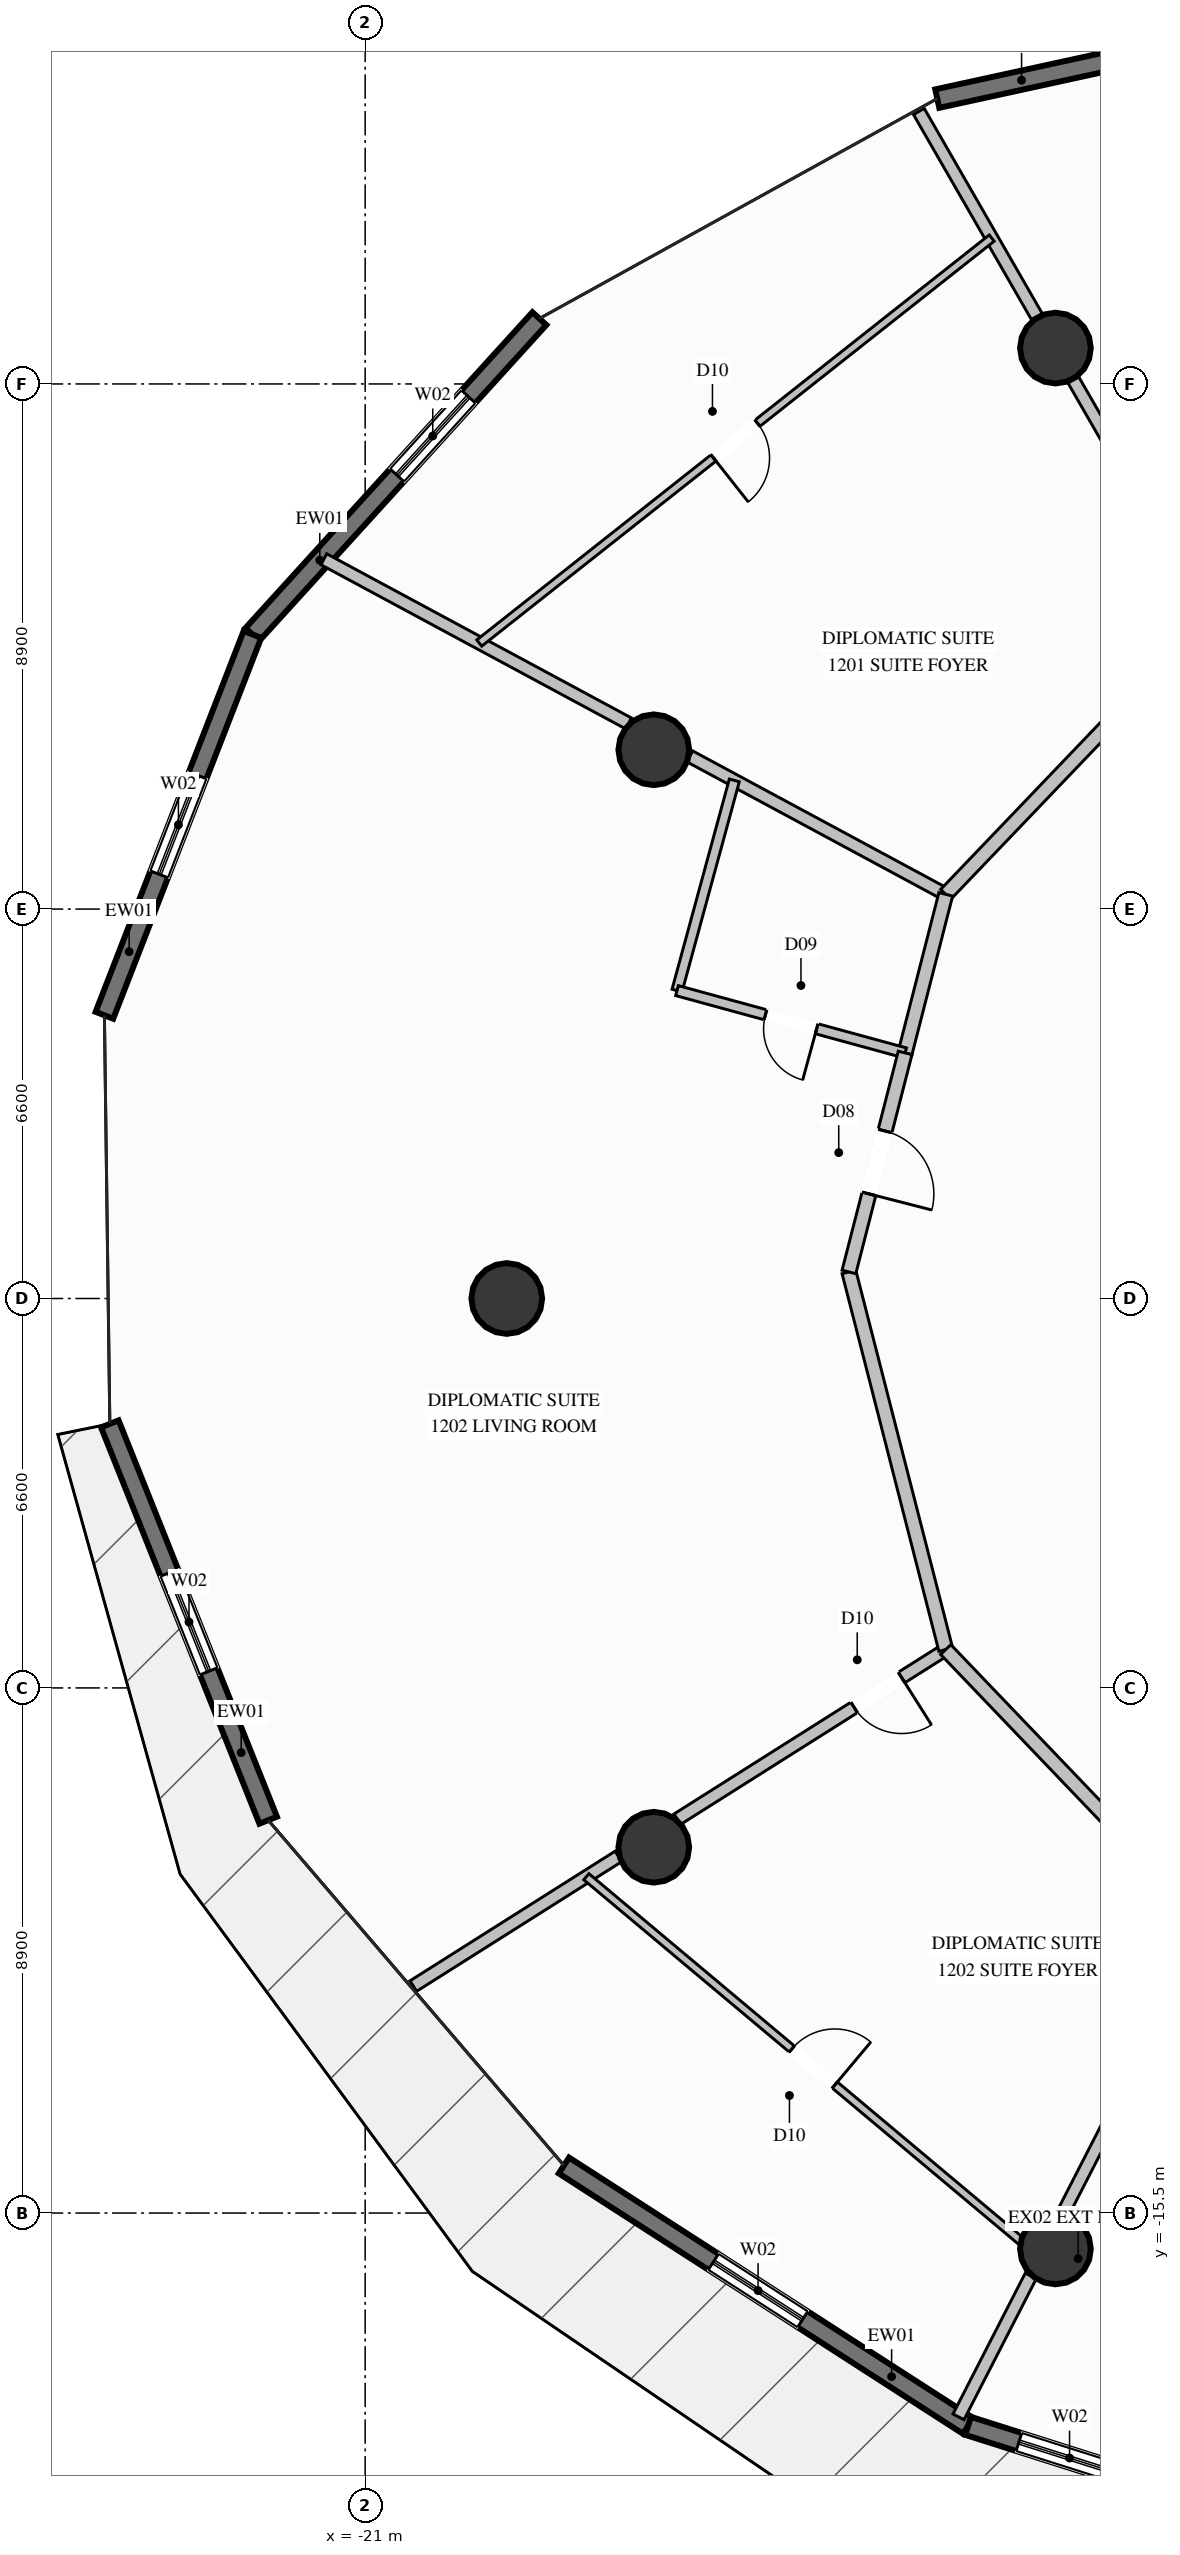
"""IFC4 building model, lengths in metres.
Left out: names, types, materials, properties, quantities, classifications, styles, units other than length and angle.
Written with IfcOpenShell. Run it as: python <this file> out.ifc"""

import sys

from ifc_helpers import new_model, si_unit, direction, frame, frame_2d, origin, origin_2d, place, context, subcontext, project, spatial, rectangle, circle, extrude, element, fill, save


model = new_model("IFC4")
c1 = context("Model", 3, precision=1e-05, world=origin(), true_north=direction((0.0, 1.0)))
c2 = subcontext(c1, "Body", "Model", "MODEL_VIEW")
j1 = project(units=[si_unit("LENGTHUNIT", "METRE"), si_unit("PLANEANGLEUNIT", "RADIAN")], contexts=[c1])
p1 = place(None, origin())
s1 = spatial("IfcSite", under=j1, at=p1, CompositionType="ELEMENT")
p2 = place(p1, origin())
s2 = spatial("IfcBuilding", under=s1, at=p2, CompositionType="ELEMENT")
p3 = place(p2, frame((0.0, 0.0, 46.4)))
s3 = spatial("IfcBuildingStorey", under=s2, at=p3, CompositionType="ELEMENT", Elevation=46.4)
for number, where, z_axis, x_axis in (
    (1, (-9.3, 16.108, 0.0), (0.0, 0.0, 1.0), (1.0, 0.0, 0.0)),
    (2, (-16.108, 9.3, 0.0), (0.0, 0.0, 1.0), (1.0, 0.0, 0.0)),
    (3, (-18.6, 0.0, 0.0), (0.0, 0.0, 1.0), (1.0, 0.0, 0.0)),
    (4, (-16.108, -9.3, 0.0), (0.0, 0.0, 1.0), (1.0, 0.0, 0.0)),
    (5, (-9.3, -16.108, 0.0), (0.0, 0.0, 1.0), (1.0, 0.0, 0.0)),
):
    element("IfcColumn", number, at=place(p3, frame(where, z_axis=z_axis, x_axis=x_axis)), inside=s3, PredefinedType="COLUMN", context=c2, shape_type="SweptSolid", body=[
        extrude(circle(Radius=0.6, at=origin_2d()), origin(), (0.0, 0.0, 1.0), 3.6),
    ])
p4 = place(p3, frame((-11.303, 20.336, 0.0), z_axis=(0.0, 0.0, 1.0), x_axis=(0.977017916809, 0.213157196066, 0.0)))
e6 = element("IfcWall", 6, at=p4, inside=s3, PredefinedType="SOLIDWALL", context=c2, shape_type="SweptSolid", body=[
    extrude(rectangle(XDim=8.149, YDim=0.32, at=frame_2d((4.075, 0.0))), origin(), (0.0, 0.0, 1.0), 3.34),
])
p5 = place(p4, frame((3.175, 0.0, 0.35)))
e7 = element("IfcOpeningElement", 7, at=p5, cuts=e6, PredefinedType="OPENING", context=c2, shape_type="SweptSolid", body=[
    extrude(rectangle(XDim=1.8, YDim=2.6, at=frame_2d((0.9, 1.3))), frame((0.0, 0.17, 0.0), z_axis=(0.0, -1.0, 0.0), x_axis=(1.0, 0.0, 0.0)), (0.0, 0.0, 1.0), 0.34),
])
p6 = place(p3, frame((-22.911, 11.255, 0.0), z_axis=(0.0, 0.0, 1.0), x_axis=(0.67247451432, 0.740120279137, 0.0)))
e8 = element("IfcWall", 8, at=p6, inside=s3, PredefinedType="SOLIDWALL", context=c2, shape_type="SweptSolid", body=[
    extrude(rectangle(XDim=7.233, YDim=0.32, at=frame_2d((3.616, 0.0))), origin(), (0.0, 0.0, 1.0), 3.34),
])
p7 = place(p6, frame((3.645, 0.0, 0.35)))
e9 = element("IfcOpeningElement", 9, at=p7, cuts=e8, PredefinedType="OPENING", context=c2, shape_type="SweptSolid", body=[
    extrude(rectangle(XDim=1.8, YDim=2.6, at=frame_2d((0.9, 1.3))), frame((0.0, 0.17, 0.0), z_axis=(0.0, -1.0, 0.0), x_axis=(1.0, 0.0, 0.0)), (0.0, 0.0, 1.0), 0.34),
])
p8 = place(p3, frame((-25.42, 4.8, 0.0), z_axis=(0.0, 0.0, 1.0), x_axis=(0.362298249398, 0.93206221814, 0.0)))
e10 = element("IfcWall", 10, at=p8, inside=s3, PredefinedType="SOLIDWALL", context=c2, shape_type="SweptSolid", body=[
    extrude(rectangle(XDim=6.925, YDim=0.32, at=frame_2d((3.463, 0.0))), origin(), (0.0, 0.0, 1.0), 3.34),
])
p9 = place(p8, frame((2.563, 0.0, 0.35)))
e11 = element("IfcOpeningElement", 11, at=p9, cuts=e10, PredefinedType="OPENING", context=c2, shape_type="SweptSolid", body=[
    extrude(rectangle(XDim=1.8, YDim=2.6, at=frame_2d((0.9, 1.3))), frame((0.0, 0.17, 0.0), z_axis=(0.0, -1.0, 0.0), x_axis=(1.0, 0.0, 0.0)), (0.0, 0.0, 1.0), 0.34),
])
p10 = place(p3, frame((-22.644, -8.842, 0.0), z_axis=(0.0, 0.0, 1.0), x_axis=(-0.371035671342, 0.928618614175, 0.0)))
e12 = element("IfcWall", 12, at=p10, inside=s3, PredefinedType="SOLIDWALL", context=c2, shape_type="SweptSolid", body=[
    extrude(rectangle(XDim=7.233, YDim=0.32, at=frame_2d((3.617, 0.0))), origin(), (0.0, 0.0, 1.0), 3.34),
])
p11 = place(p10, frame((2.717, 0.0, 0.35)))
e13 = element("IfcOpeningElement", 13, at=p11, cuts=e12, PredefinedType="OPENING", context=c2, shape_type="SweptSolid", body=[
    extrude(rectangle(XDim=1.8, YDim=2.6, at=frame_2d((0.9, 1.3))), frame((0.0, 0.17, 0.0), z_axis=(0.0, -1.0, 0.0), x_axis=(1.0, 0.0, 0.0)), (0.0, 0.0, 1.0), 0.34),
])
p12 = place(p3, frame((-10.78, -19.107, 0.0), z_axis=(0.0, 0.0, 1.0), x_axis=(-0.840699239941, 0.541502343451, 0.0)))
e14 = element("IfcWall", 14, at=p12, inside=s3, PredefinedType="SOLIDWALL", context=c2, shape_type="SweptSolid", body=[
    extrude(rectangle(XDim=8.149, YDim=0.32, at=frame_2d((4.075, 0.0))), origin(), (0.0, 0.0, 1.0), 3.34),
])
p13 = place(p12, frame((3.335, 0.0, 0.35)))
e15 = element("IfcOpeningElement", 15, at=p13, cuts=e14, PredefinedType="OPENING", context=c2, shape_type="SweptSolid", body=[
    extrude(rectangle(XDim=1.8, YDim=2.6, at=frame_2d((0.9, 1.3))), frame((0.0, 0.17, 0.0), z_axis=(0.0, -1.0, 0.0), x_axis=(1.0, 0.0, 0.0)), (0.0, 0.0, 1.0), 0.34),
])
p14 = place(p3, frame((-2.761, -21.65, 0.0), z_axis=(0.0, 0.0, 1.0), x_axis=(-0.953218809013, 0.302281164059, 0.0)))
e16 = element("IfcWall", 16, at=p14, inside=s3, PredefinedType="SOLIDWALL", context=c2, shape_type="SweptSolid", body=[
    extrude(rectangle(XDim=8.413, YDim=0.32, at=frame_2d((4.206, 0.0))), origin(), (0.0, 0.0, 1.0), 3.34),
])
p15 = place(p14, frame((5.709, 0.0, 0.35)))
e17 = element("IfcOpeningElement", 17, at=p15, cuts=e16, PredefinedType="OPENING", context=c2, shape_type="SweptSolid", body=[
    extrude(rectangle(XDim=1.8, YDim=2.6, at=frame_2d((0.9, 1.3))), frame((0.0, 0.17, 0.0), z_axis=(0.0, -1.0, 0.0), x_axis=(1.0, 0.0, 0.0)), (0.0, 0.0, 1.0), 0.34),
])
p16 = place(p14, frame((3.656, 0.0, 0.0)))
e18 = element("IfcOpeningElement", 18, at=p16, cuts=e16, PredefinedType="OPENING", context=c2, shape_type="SweptSolid", body=[
    extrude(rectangle(XDim=1.1, YDim=2.2, at=frame_2d((0.55, 1.1))), frame((0.0, 0.17, 0.0), z_axis=(0.0, -1.0, 0.0), x_axis=(1.0, 0.0, 0.0)), (0.0, 0.0, 1.0), 0.34),
])
p17 = place(p3, frame((-6.675, 11.535, 0.0), z_axis=(0.0, 0.0, 1.0), x_axis=(-0.498786523098, 0.866724872365, 0.0)))
e19 = element("IfcWall", 19, at=p17, inside=s3, PredefinedType="PARTITIONING", context=c2, shape_type="SweptSolid", body=[
    extrude(rectangle(XDim=4.653, YDim=0.21, at=frame_2d((2.327, 0.0))), origin(), (0.0, 0.0, 1.0), 2.709),
])
p18 = place(p17, frame((0.741, 0.0, 0.0)))
e20 = element("IfcOpeningElement", 20, at=p18, cuts=e19, PredefinedType="OPENING", context=c2, shape_type="SweptSolid", body=[
    extrude(rectangle(XDim=0.95, YDim=2.1, at=frame_2d((0.475, 1.05))), frame((0.0, 0.115, 0.0), z_axis=(0.0, -1.0, 0.0), x_axis=(1.0, 0.0, 0.0)), (0.0, 0.0, 1.0), 0.23),
])
p19 = place(p3, frame((-9.615, 16.642, 0.0), z_axis=(0.0, 0.0, 1.0), x_axis=(-0.498733039203, 0.866755649308, 0.0)))
e21 = element("IfcWall", 21, at=p19, inside=s3, PredefinedType="PARTITIONING", context=c2, shape_type="SweptSolid", body=[
    extrude(rectangle(XDim=4.01, YDim=0.21, at=frame_2d((2.005, 0.0))), origin(), (0.0, 0.0, 1.0), 3.34),
])
p20 = place(p3, frame((-11.159, 6.85, 0.0), z_axis=(0.0, 0.0, 1.0), x_axis=(-0.880348601535, 0.474327249665, 0.0)))
e22 = element("IfcWall", 22, at=p20, inside=s3, PredefinedType="PARTITIONING", context=c2, shape_type="SweptSolid", body=[
    extrude(rectangle(XDim=4.929, YDim=0.21, at=frame_2d((2.464, 0.0))), origin(), (0.0, 0.0, 1.0), 2.709),
])
p21 = place(p3, frame((-16.537, 9.747, 0.0), z_axis=(0.0, 0.0, 1.0), x_axis=(-0.880366830353, 0.47429341553, 0.0)))
e23 = element("IfcWall", 23, at=p21, inside=s3, PredefinedType="PARTITIONING", context=c2, shape_type="SweptSolid", body=[
    extrude(rectangle(XDim=5.865, YDim=0.21, at=frame_2d((2.933, 0.0))), origin(), (0.0, 0.0, 1.0), 3.34),
])
p22 = place(p3, frame((-11.159, -5.95, 0.0), z_axis=(0.0, 0.0, 1.0), x_axis=(-0.845381098804, -0.534163643264, 0.0)))
e24 = element("IfcWall", 24, at=p22, inside=s3, PredefinedType="PARTITIONING", context=c2, shape_type="SweptSolid", body=[
    extrude(rectangle(XDim=5.382, YDim=0.21, at=frame_2d((2.691, 0.0))), origin(), (0.0, 0.0, 1.0), 2.709),
])
p23 = place(p22, frame((0.886, 0.0, 0.0)))
e25 = element("IfcOpeningElement", 25, at=p23, cuts=e24, PredefinedType="OPENING", context=c2, shape_type="SweptSolid", body=[
    extrude(rectangle(XDim=0.95, YDim=2.1, at=frame_2d((0.475, 1.05))), frame((0.0, 0.115, 0.0), z_axis=(0.0, -1.0, 0.0), x_axis=(1.0, 0.0, 0.0)), (0.0, 0.0, 1.0), 0.23),
])
p24 = place(p3, frame((-16.708, -9.456, 0.0), z_axis=(0.0, 0.0, 1.0), x_axis=(-0.845312509881, -0.534272178425, 0.0)))
e26 = element("IfcWall", 26, at=p24, inside=s3, PredefinedType="PARTITIONING", context=c2, shape_type="SweptSolid", body=[
    extrude(rectangle(XDim=4.112, YDim=0.21, at=frame_2d((2.056, 0.0))), origin(), (0.0, 0.0, 1.0), 3.34),
])
p25 = place(p3, frame((-6.675, -10.635, 0.0), z_axis=(0.0, 0.0, 1.0), x_axis=(-0.456563129712, -0.889691018605, 0.0)))
e27 = element("IfcWall", 27, at=p25, inside=s3, PredefinedType="PARTITIONING", context=c2, shape_type="SweptSolid", body=[
    extrude(rectangle(XDim=5.469, YDim=0.21, at=frame_2d((2.735, 0.0))), origin(), (0.0, 0.0, 1.0), 2.709),
])
p26 = place(p3, frame((-9.718, -16.566, 0.0), z_axis=(0.0, 0.0, 1.0), x_axis=(-0.456431135396, -0.889758741818, 0.0)))
e28 = element("IfcWall", 28, at=p26, inside=s3, PredefinedType="PARTITIONING", context=c2, shape_type="SweptSolid", body=[
    extrude(rectangle(XDim=2.684, YDim=0.21, at=frame_2d((1.342, 0.0))), origin(), (0.0, 0.0, 1.0), 3.34),
])
p27 = place(p3, frame((-6.675, 11.535, 0.0), z_axis=(0.0, 0.0, 1.0), x_axis=(-0.691444859665, -0.722429239471, 0.0)))
e29 = element("IfcWall", 29, at=p27, inside=s3, PredefinedType="PARTITIONING", context=c2, shape_type="SweptSolid", body=[
    extrude(rectangle(XDim=6.485, YDim=0.24, at=frame_2d((3.242, 0.0))), origin(), (0.0, 0.0, 1.0), 3.34),
])
p28 = place(p3, frame((-10.38, 17.972, 0.0), z_axis=(0.0, 0.0, 1.0), x_axis=(-0.784634878258, -0.619958150056, 0.0)))
e30 = element("IfcWall", 30, at=p28, inside=s3, PredefinedType="PARTITIONING", context=c2, shape_type="SweptSolid", body=[
    extrude(rectangle(XDim=11.07, YDim=0.135, at=frame_2d((5.535, 0.0))), origin(), (0.0, 0.0, 1.0), 3.34),
])
p29 = place(p28, frame((5.06, 0.0, 0.0)))
e31 = element("IfcOpeningElement", 31, at=p29, cuts=e30, PredefinedType="OPENING", context=c2, shape_type="SweptSolid", body=[
    extrude(rectangle(XDim=0.95, YDim=2.1, at=frame_2d((0.475, 1.05))), frame((0.0, 0.078, 0.0), z_axis=(0.0, -1.0, 0.0), x_axis=(1.0, 0.0, 0.0)), (0.0, 0.0, 1.0), 0.155),
])
p30 = place(p3, frame((-11.159, 6.85, 0.0), z_axis=(0.0, 0.0, 1.0), x_axis=(-0.248286444079, -0.968686658154, 0.0)))
e32 = element("IfcWall", 32, at=p30, inside=s3, PredefinedType="PARTITIONING", context=c2, shape_type="SweptSolid", body=[
    extrude(rectangle(XDim=2.775, YDim=0.24, at=frame_2d((1.387, 0.0))), origin(), (0.0, 0.0, 1.0), 3.34),
])
p31 = place(p3, frame((-14.743, 8.781, 0.0), z_axis=(0.0, 0.0, 1.0), x_axis=(-0.262983150331, -0.964800426328, 0.0)))
e33 = element("IfcWall", 33, at=p31, inside=s3, PredefinedType="PLUMBINGWALL", context=c2, shape_type="SweptSolid", body=[
    extrude(rectangle(XDim=3.693, YDim=0.175, at=frame_2d((1.846, 0.0))), origin(), (0.0, 0.0, 1.0), 3.34),
])
p32 = place(p3, frame((-11.848, 4.162, 0.0), z_axis=(0.0, 0.0, 1.0), x_axis=(-0.964669573549, 0.263462737156, 0.0)))
e34 = element("IfcWall", 34, at=p32, inside=s3, PredefinedType="PLUMBINGWALL", context=c2, shape_type="SweptSolid", body=[
    extrude(rectangle(XDim=4.008, YDim=0.175, at=frame_2d((2.004, 0.0))), origin(), (0.0, 0.0, 1.0), 3.34),
])
p33 = place(p32, frame((1.554, 0.0, 0.0)))
e35 = element("IfcOpeningElement", 35, at=p33, cuts=e34, PredefinedType="OPENING", context=c2, shape_type="SweptSolid", body=[
    extrude(rectangle(XDim=0.9, YDim=2.1, at=frame_2d((0.45, 1.05))), frame((0.0, 0.098, 0.0), z_axis=(0.0, -1.0, 0.0), x_axis=(1.0, 0.0, 0.0)), (0.0, 0.0, 1.0), 0.195),
])
p34 = place(p3, frame((-12.8, 0.45, 0.0), z_axis=(0.0, 0.0, 1.0), x_axis=(0.24839135289, -0.968659762667, 0.0)))
e36 = element("IfcWall", 36, at=p34, inside=s3, PredefinedType="PARTITIONING", context=c2, shape_type="SweptSolid", body=[
    extrude(rectangle(XDim=6.607, YDim=0.24, at=frame_2d((3.303, 0.0))), origin(), (0.0, 0.0, 1.0), 3.34),
])
p35 = place(p3, frame((-11.848, 4.162, 0.0), z_axis=(0.0, 0.0, 1.0), x_axis=(-0.248451984896, -0.968644212909, 0.0)))
e37 = element("IfcWall", 37, at=p35, inside=s3, PredefinedType="PARTITIONING", context=c2, shape_type="SweptSolid", body=[
    extrude(rectangle(XDim=3.832, YDim=0.24, at=frame_2d((1.916, 0.0))), origin(), (0.0, 0.0, 1.0), 3.34),
])
p36 = place(p35, frame((1.366, 0.0, 0.0)))
e38 = element("IfcOpeningElement", 38, at=p36, cuts=e37, PredefinedType="OPENING", context=c2, shape_type="SweptSolid", body=[
    extrude(rectangle(XDim=1.1, YDim=2.3, at=frame_2d((0.55, 1.15))), frame((0.0, 0.13, 0.0), z_axis=(0.0, -1.0, 0.0), x_axis=(1.0, 0.0, 0.0)), (0.0, 0.0, 1.0), 0.26),
])
p37 = place(p3, frame((-11.159, -5.95, 0.0), z_axis=(0.0, 0.0, 1.0), x_axis=(0.691426053968, -0.722447238138, 0.0)))
e39 = element("IfcWall", 39, at=p37, inside=s3, PredefinedType="PARTITIONING", context=c2, shape_type="SweptSolid", body=[
    extrude(rectangle(XDim=6.485, YDim=0.24, at=frame_2d((3.242, 0.0))), origin(), (0.0, 0.0, 1.0), 3.34),
])
p38 = place(p3, frame((-17.251, -9.8, 0.0), z_axis=(0.0, 0.0, 1.0), x_axis=(0.766386533377, -0.642379701935, 0.0)))
e40 = element("IfcWall", 40, at=p38, inside=s3, PredefinedType="PARTITIONING", context=c2, shape_type="SweptSolid", body=[
    extrude(rectangle(XDim=10.041, YDim=0.135, at=frame_2d((5.021, 0.0))), origin(), (0.0, 0.0, 1.0), 2.792),
])
p39 = place(p38, frame((4.545, 0.0, 0.0)))
e41 = element("IfcOpeningElement", 41, at=p39, cuts=e40, PredefinedType="OPENING", context=c2, shape_type="SweptSolid", body=[
    extrude(rectangle(XDim=0.95, YDim=2.1, at=frame_2d((0.475, 1.05))), frame((0.0, 0.078, 0.0), z_axis=(0.0, -1.0, 0.0), x_axis=(1.0, 0.0, 0.0)), (0.0, 0.0, 1.0), 0.155),
])
p40 = place(p7, origin())
e42 = element("IfcWindow", 42, at=p40, inside=s3, PartitioningType="SINGLE_PANEL", PredefinedType="WINDOW", context=c2, shape_type="SweptSolid", body=[
    extrude(rectangle(XDim=1.8, YDim=2.6, at=frame_2d((0.9, 1.3))), frame((0.0, 0.03, 0.0), z_axis=(0.0, -1.0, 0.0), x_axis=(1.0, 0.0, 0.0)), (0.0, 0.0, 1.0), 0.06),
])
fill(e9, e42)
p41 = place(p9, origin())
e43 = element("IfcWindow", 43, at=p41, inside=s3, PartitioningType="SINGLE_PANEL", PredefinedType="WINDOW", context=c2, shape_type="SweptSolid", body=[
    extrude(rectangle(XDim=1.8, YDim=2.6, at=frame_2d((0.9, 1.3))), frame((0.0, 0.03, 0.0), z_axis=(0.0, -1.0, 0.0), x_axis=(1.0, 0.0, 0.0)), (0.0, 0.0, 1.0), 0.06),
])
fill(e11, e43)
p42 = place(p11, origin())
e44 = element("IfcWindow", 44, at=p42, inside=s3, PartitioningType="SINGLE_PANEL", PredefinedType="WINDOW", context=c2, shape_type="SweptSolid", body=[
    extrude(rectangle(XDim=1.8, YDim=2.6, at=frame_2d((0.9, 1.3))), frame((0.0, 0.03, 0.0), z_axis=(0.0, -1.0, 0.0), x_axis=(1.0, 0.0, 0.0)), (0.0, 0.0, 1.0), 0.06),
])
fill(e13, e44)
p43 = place(p13, origin())
e45 = element("IfcWindow", 45, at=p43, inside=s3, PartitioningType="SINGLE_PANEL", PredefinedType="WINDOW", context=c2, shape_type="SweptSolid", body=[
    extrude(rectangle(XDim=1.8, YDim=2.6, at=frame_2d((0.9, 1.3))), frame((0.0, 0.03, 0.0), z_axis=(0.0, -1.0, 0.0), x_axis=(1.0, 0.0, 0.0)), (0.0, 0.0, 1.0), 0.06),
])
fill(e15, e45)
p44 = place(p15, origin())
e46 = element("IfcWindow", 46, at=p44, inside=s3, PartitioningType="SINGLE_PANEL", PredefinedType="WINDOW", context=c2, shape_type="SweptSolid", body=[
    extrude(rectangle(XDim=1.8, YDim=2.6, at=frame_2d((0.9, 1.3))), frame((0.0, 0.03, 0.0), z_axis=(0.0, -1.0, 0.0), x_axis=(1.0, 0.0, 0.0)), (0.0, 0.0, 1.0), 0.06),
])
fill(e17, e46)
p45 = place(p29, origin())
e47 = element("IfcDoor", 47, at=p45, inside=s3, OperationType="SINGLE_SWING_RIGHT", PredefinedType="DOOR", context=c2, shape_type="SweptSolid", body=[
    extrude(rectangle(XDim=0.95, YDim=2.1, at=frame_2d((0.475, 1.05))), frame((0.0, 0.025, 0.0), z_axis=(0.0, -1.0, 0.0), x_axis=(1.0, 0.0, 0.0)), (0.0, 0.0, 1.0), 0.05),
])
fill(e31, e47)
p46 = place(p33, origin())
e48 = element("IfcDoor", 48, at=p46, inside=s3, OperationType="SINGLE_SWING_LEFT", PredefinedType="DOOR", context=c2, shape_type="SweptSolid", body=[
    extrude(rectangle(XDim=0.9, YDim=2.1, at=frame_2d((0.45, 1.05))), frame((0.0, 0.025, 0.0), z_axis=(0.0, -1.0, 0.0), x_axis=(1.0, 0.0, 0.0)), (0.0, 0.0, 1.0), 0.05),
])
fill(e35, e48)
p47 = place(p36, origin())
e49 = element("IfcDoor", 49, at=p47, inside=s3, OperationType="SINGLE_SWING_RIGHT", PredefinedType="DOOR", context=c2, shape_type="SweptSolid", body=[
    extrude(rectangle(XDim=1.1, YDim=2.3, at=frame_2d((0.55, 1.15))), frame((0.0, 0.025, 0.0), z_axis=(0.0, -1.0, 0.0), x_axis=(1.0, 0.0, 0.0)), (0.0, 0.0, 1.0), 0.05),
])
fill(e38, e49)
p48 = place(p23, origin())
e50 = element("IfcDoor", 50, at=p48, inside=s3, OperationType="SINGLE_SWING_LEFT", PredefinedType="DOOR", context=c2, shape_type="SweptSolid", body=[
    extrude(rectangle(XDim=0.95, YDim=2.1, at=frame_2d((0.475, 1.05))), frame((0.0, 0.025, 0.0), z_axis=(0.0, -1.0, 0.0), x_axis=(1.0, 0.0, 0.0)), (0.0, 0.0, 1.0), 0.05),
])
fill(e25, e50)
p49 = place(p39, origin())
e51 = element("IfcDoor", 51, at=p49, inside=s3, OperationType="SINGLE_SWING_RIGHT", PredefinedType="DOOR", context=c2, shape_type="SweptSolid", body=[
    extrude(rectangle(XDim=0.95, YDim=2.1, at=frame_2d((0.475, 1.05))), frame((0.0, 0.025, 0.0), z_axis=(0.0, -1.0, 0.0), x_axis=(1.0, 0.0, 0.0)), (0.0, 0.0, 1.0), 0.05),
])
fill(e41, e51)
save(model, sys.argv[1])
